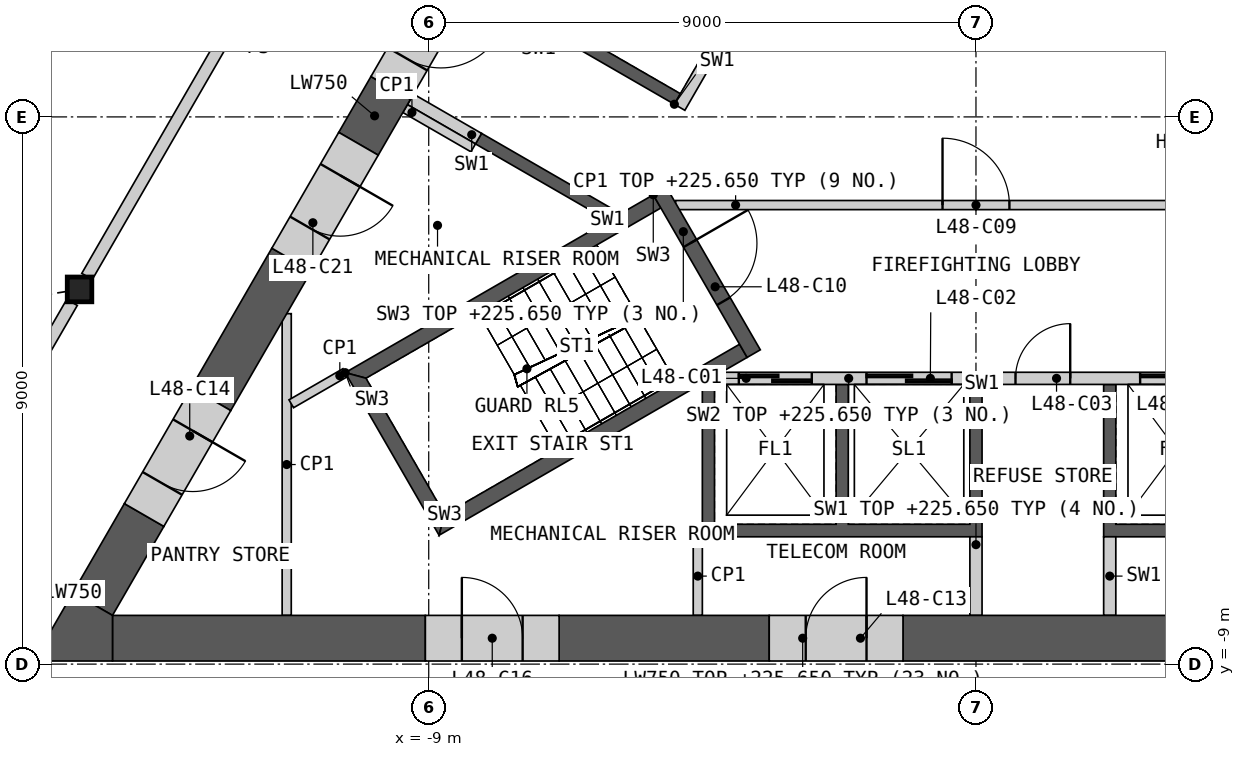
"""IFC4 building model, lengths in metres.
Left out: names, types, materials, properties, quantities, classifications, styles, units other than length and angle.
Written with IfcOpenShell. Run it as: python <this file> out.ifc"""

import sys

from ifc_helpers import new_model, si_unit, direction, frame, frame_2d, origin, origin_2d, place, context, subcontext, project, spatial, polyline, rectangle, i_section, outline, extrude, element, fill, save


model = new_model("IFC4")
c1 = context("Model", 3, precision=1e-05, world=origin(), true_north=direction((0.0, 1.0)))
c2 = subcontext(c1, "Body", "Model", "MODEL_VIEW")
j1 = project(units=[si_unit("LENGTHUNIT", "METRE"), si_unit("PLANEANGLEUNIT", "RADIAN")], contexts=[c1])
p1 = place(None, origin())
s1 = spatial("IfcSite", under=j1, at=p1, CompositionType="ELEMENT")
p2 = place(p1, origin())
s2 = spatial("IfcBuilding", under=s1, at=p2, CompositionType="ELEMENT")
p3 = place(p2, frame((0.0, 0.0, 216.0)))
s3 = spatial("IfcBuildingStorey", under=s2, at=p3, CompositionType="ELEMENT", Elevation=216.0)
p4 = place(p3, frame((-14.743, -2.837, 0.0), z_axis=(0.0, 0.0, 1.0), x_axis=(1.0, 0.0, 0.0)))
e1 = element("IfcColumn", 1, at=p4, inside=s3, PredefinedType="COLUMN", context=c2, shape_type="SweptSolid", body=[
    extrude(i_section(OverallWidth=0.404, OverallDepth=0.407, WebThickness=0.027, FlangeThickness=0.044, at=origin_2d()), origin(), (0.0, 0.0, 1.0), 10.0),
])
p5 = place(p3, origin())
e2 = element("IfcWall", 2, at=p5, inside=s3, PredefinedType="SHEAR", context=c2, shape_type="SweptSolid", body=[
    extrude(outline(polyline([(4.5, -4.4), (4.5, -6.906), (2.1, -6.906), (2.1, -4.4), (2.3, -4.4), (2.3, -6.7), (4.3, -6.7), (4.3, -4.4), (4.5, -4.4)])), origin(), (0.0, 0.0, 1.0), 9.65),
])
p6 = place(p3, origin())
e3 = element("IfcWall", 3, at=p6, inside=s3, PredefinedType="SHEAR", context=c2, shape_type="SweptSolid", body=[
    extrude(outline(polyline([(0.1, -4.4), (0.1, -6.906), (-4.5, -6.906), (-4.5, -4.4), (-4.3, -4.4), (-4.3, -6.7), (-2.3, -6.7), (-2.3, -4.4), (-2.1, -4.4), (-2.1, -6.7), (-0.1, -6.7), (-0.1, -4.4), (0.1, -4.4)])), origin(), (0.0, 0.0, 1.0), 9.65),
])
p7 = place(p3, frame((-4.187, -4.3, 0.0), z_axis=(0.0, 0.0, 1.0), x_axis=(1.0, 0.0, 0.0)))
e4 = element("IfcWall", 4, at=p7, inside=s3, PredefinedType="SOLIDWALL", context=c2, shape_type="SweptSolid", body=[
    extrude(rectangle(XDim=8.373, YDim=0.2, at=frame_2d((4.187, 0.0))), origin(), (0.0, 0.0, 1.0), 9.65),
])
p8 = place(p7, frame((0.287, 0.0, 0.0)))
e5 = element("IfcOpeningElement", 5, at=p8, cuts=e4, PredefinedType="OPENING", context=c2, shape_type="SweptSolid", body=[
    extrude(rectangle(XDim=1.2, YDim=2.1, at=frame_2d((0.6, 1.05))), frame((0.0, 0.11, 0.0), z_axis=(0.0, -1.0, 0.0), x_axis=(1.0, 0.0, 0.0)), (0.0, 0.0, 1.0), 0.22),
])
p9 = place(p7, frame((2.387, 0.0, 0.0)))
e6 = element("IfcOpeningElement", 6, at=p9, cuts=e4, PredefinedType="OPENING", context=c2, shape_type="SweptSolid", body=[
    extrude(rectangle(XDim=1.4, YDim=2.1, at=frame_2d((0.7, 1.05))), frame((0.0, 0.11, 0.0), z_axis=(0.0, -1.0, 0.0), x_axis=(1.0, 0.0, 0.0)), (0.0, 0.0, 1.0), 0.22),
])
p10 = place(p7, frame((4.837, 0.0, 0.0)))
e7 = element("IfcOpeningElement", 7, at=p10, cuts=e4, PredefinedType="OPENING", context=c2, shape_type="SweptSolid", body=[
    extrude(rectangle(XDim=0.9, YDim=2.1, at=frame_2d((0.45, 1.05))), frame((0.0, 0.11, 0.0), z_axis=(0.0, -1.0, 0.0), x_axis=(1.0, 0.0, 0.0)), (0.0, 0.0, 1.0), 0.22),
])
p11 = place(p7, frame((6.887, 0.0, 0.0)))
e8 = element("IfcOpeningElement", 8, at=p11, cuts=e4, PredefinedType="OPENING", context=c2, shape_type="SweptSolid", body=[
    extrude(rectangle(XDim=1.2, YDim=2.1, at=frame_2d((0.6, 1.05))), frame((0.0, 0.11, 0.0), z_axis=(0.0, -1.0, 0.0), x_axis=(1.0, 0.0, 0.0)), (0.0, 0.0, 1.0), 0.22),
])
for number, where, z_axis, x_axis in (
    (9, (0.0, -6.906, 0.0), (0.0, 0.0, 1.0), (0.0, -1.0, 0.0)),
    (10, (2.2, -6.906, 0.0), (0.0, 0.0, 1.0), (0.0, -1.0, 0.0)),
):
    element("IfcWall", number, at=place(p3, frame(where, z_axis=z_axis, x_axis=x_axis)), inside=s3, PredefinedType="SHEAR", context=c2, shape_type="SweptSolid", body=[
        extrude(rectangle(XDim=1.293, YDim=0.2, at=frame_2d((0.646, 0.0))), origin(), (0.0, 0.0, 1.0), 9.65),
    ])
p12 = place(p3, origin())
e11 = element("IfcWall", 11, at=p12, inside=s3, PredefinedType="SHEAR", context=c2, shape_type="SweptSolid", body=[
    extrude(outline(polyline([(1.561, 6.097), (3.731, 7.35), (8.231, -0.444), (6.061, -1.697), (5.96, -1.524), (7.952, -0.374), (4.752, 5.169), (2.76, 4.019), (2.66, 4.192), (4.652, 5.342), (3.652, 7.074), (1.66, 5.924), (1.561, 6.097)])), origin(), (0.0, 0.0, 1.0), 9.65),
])
p13 = place(p3, frame((5.817, -1.476, 0.0), z_axis=(0.0, 0.0, 1.0), x_axis=(-0.500002616675, 0.866023893041, 0.0)))
e12 = element("IfcWall", 12, at=p13, inside=s3, PredefinedType="SOLIDWALL", context=c2, shape_type="SweptSolid", body=[
    extrude(rectangle(XDim=8.373, YDim=0.2, at=frame_2d((4.187, 0.0))), origin(), (0.0, 0.0, 1.0), 9.65),
])
p14 = place(p13, frame((2.637, 0.0, 0.0)))
e13 = element("IfcOpeningElement", 13, at=p14, cuts=e12, PredefinedType="OPENING", context=c2, shape_type="SweptSolid", body=[
    extrude(rectangle(XDim=0.9, YDim=2.1, at=frame_2d((0.45, 1.05))), frame((0.0, 0.11, 0.0), z_axis=(0.0, -1.0, 0.0), x_axis=(1.0, 0.0, 0.0)), (0.0, 0.0, 1.0), 0.22),
])
p15 = place(p13, frame((6.937, 0.0, 0.0)))
e14 = element("IfcOpeningElement", 14, at=p15, cuts=e12, PredefinedType="OPENING", context=c2, shape_type="SweptSolid", body=[
    extrude(rectangle(XDim=1.1, YDim=2.1, at=frame_2d((0.55, 1.05))), frame((0.0, 0.11, 0.0), z_axis=(0.0, -1.0, 0.0), x_axis=(1.0, 0.0, 0.0)), (0.0, 0.0, 1.0), 0.22),
])
p16 = place(p3, origin())
e15 = element("IfcWall", 15, at=p16, inside=s3, PredefinedType="SHEAR", context=c2, shape_type="SweptSolid", body=[
    extrude(outline(polyline([(-6.061, -1.697), (-8.231, -0.444), (-8.131, -0.271), (-5.96, -1.524), (-6.061, -1.697)])), origin(), (0.0, 0.0, 1.0), 9.65),
])
p17 = place(p3, origin())
e16 = element("IfcWall", 16, at=p17, inside=s3, PredefinedType="SHEAR", context=c2, shape_type="SweptSolid", body=[
    extrude(outline(polyline([(-4.96, 0.208), (-7.131, 1.461), (-3.731, 7.35), (-1.561, 6.097), (-1.66, 5.924), (-3.652, 7.074), (-4.652, 5.342), (-2.66, 4.192), (-2.76, 4.019), (-4.752, 5.169), (-5.752, 3.437), (-3.76, 2.287), (-3.861, 2.113), (-5.852, 3.263), (-6.852, 1.531), (-4.861, 0.381), (-4.96, 0.208)])), origin(), (0.0, 0.0, 1.0), 9.65),
])
p18 = place(p3, frame((-1.631, 5.776, 0.0), z_axis=(0.0, 0.0, 1.0), x_axis=(-0.499992876559, -0.866029516466, 0.0)))
e17 = element("IfcWall", 17, at=p18, inside=s3, PredefinedType="SOLIDWALL", context=c2, shape_type="SweptSolid", body=[
    extrude(rectangle(XDim=6.486, YDim=0.2, at=frame_2d((3.243, 0.0))), origin(), (0.0, 0.0, 1.0), 9.65),
])
p19 = place(p18, frame((0.337, 0.0, 0.0)))
e18 = element("IfcOpeningElement", 18, at=p19, cuts=e17, PredefinedType="OPENING", context=c2, shape_type="SweptSolid", body=[
    extrude(rectangle(XDim=1.1, YDim=2.1, at=frame_2d((0.55, 1.05))), frame((0.0, 0.11, 0.0), z_axis=(0.0, -1.0, 0.0), x_axis=(1.0, 0.0, 0.0)), (0.0, 0.0, 1.0), 0.22),
])
p20 = place(p18, frame((2.537, 0.0, 0.0)))
e19 = element("IfcOpeningElement", 19, at=p20, cuts=e17, PredefinedType="OPENING", context=c2, shape_type="SweptSolid", body=[
    extrude(rectangle(XDim=1.1, YDim=2.1, at=frame_2d((0.55, 1.05))), frame((0.0, 0.11, 0.0), z_axis=(0.0, -1.0, 0.0), x_axis=(1.0, 0.0, 0.0)), (0.0, 0.0, 1.0), 0.22),
])
p21 = place(p3, frame((-8.181, -0.357, 0.0), z_axis=(0.0, 0.0, 1.0), x_axis=(-0.866003189247, 0.500038474733, 0.0)))
e20 = element("IfcWall", 20, at=p21, inside=s3, PredefinedType="SHEAR", context=c2, shape_type="SweptSolid", body=[
    extrude(rectangle(XDim=1.293, YDim=0.2, at=frame_2d((0.646, 0.0))), origin(), (0.0, 0.0, 1.0), 9.65),
])
p22 = place(p3, frame((-4.941, -1.45, 0.0), z_axis=(0.0, 0.0, 1.0), x_axis=(1.0, 0.0, 0.0)))
e21 = element("IfcWall", 21, at=p22, inside=s3, PredefinedType="PARTITIONING", context=c2, shape_type="SweptSolid", body=[
    extrude(rectangle(XDim=9.882, YDim=0.15, at=frame_2d((4.941, 0.0))), origin(), (0.0, 0.0, 1.0), 9.65),
])
p23 = place(p22, frame((4.391, 0.0, 0.0)))
e22 = element("IfcOpeningElement", 22, at=p23, cuts=e21, PredefinedType="OPENING", context=c2, shape_type="SweptSolid", body=[
    extrude(rectangle(XDim=1.1, YDim=2.1, at=frame_2d((0.55, 1.05))), frame((0.0, 0.085, 0.0), z_axis=(0.0, -1.0, 0.0), x_axis=(1.0, 0.0, 0.0)), (0.0, 0.0, 1.0), 0.17),
])
p24 = place(p3, origin())
e23 = element("IfcWall", 23, at=p24, inside=s3, PredefinedType="SHEAR", context=c2, shape_type="SweptSolid", body=[
    extrude(outline(polyline([(-5.307, -1.281), (-10.374, -4.206), (-10.032, -4.298), (-5.182, -1.498), (-5.307, -1.281)])), origin(), (0.0, 0.0, 1.0), 9.65),
])
p25 = place(p3, origin())
e24 = element("IfcWall", 24, at=p25, inside=s3, PredefinedType="SHEAR", context=c2, shape_type="SweptSolid", body=[
    extrude(outline(polyline([(-10.374, -4.206), (-8.83, -6.881), (-8.738, -6.539), (-10.032, -4.298), (-10.374, -4.206)])), origin(), (0.0, 0.0, 1.0), 9.65),
])
p26 = place(p3, origin())
e25 = element("IfcWall", 25, at=p26, inside=s3, PredefinedType="SHEAR", context=c2, shape_type="SweptSolid", body=[
    extrude(outline(polyline([(-8.738, -6.539), (-8.83, -6.881), (-3.763, -3.956), (-3.888, -3.739), (-8.738, -6.539)])), origin(), (0.0, 0.0, 1.0), 9.65),
])
p27 = place(p3, frame((-5.199, -1.219, 0.0), z_axis=(0.0, 0.0, 1.0), x_axis=(0.499982516597, -0.866035497597, 0.0)))
e26 = element("IfcWall", 26, at=p27, inside=s3, PredefinedType="SHEAR", context=c2, shape_type="SweptSolid", body=[
    extrude(rectangle(XDim=3.088, YDim=0.25, at=frame_2d((1.544, 0.0))), origin(), (0.0, 0.0, 1.0), 9.65),
])
p28 = place(p27, frame((0.994, 0.0, 0.0)))
e27 = element("IfcOpeningElement", 27, at=p28, cuts=e26, PredefinedType="OPENING", context=c2, shape_type="SweptSolid", body=[
    extrude(rectangle(XDim=1.1, YDim=2.1, at=frame_2d((0.55, 1.05))), frame((0.0, 0.135, 0.0), z_axis=(0.0, -1.0, 0.0), x_axis=(1.0, 0.0, 0.0)), (0.0, 0.0, 1.0), 0.27),
])
for number, where, z_axis, x_axis in (
    (28, (-8.268, -0.509, 0.0), (0.0, 0.0, 1.0), (-0.866, 0.5, 0.0)),
    (29, (-4.575, -6.906, 0.0), (0.0, 0.0, 1.0), (0.0, -1.0, 0.0)),
):
    element("IfcWall", number, at=place(p3, frame(where, z_axis=z_axis, x_axis=x_axis)), inside=s3, PredefinedType="PARTITIONING", context=c2, shape_type="SweptSolid", body=[
        extrude(rectangle(XDim=1.293, YDim=0.15, at=frame_2d((0.646, 0.0))), origin(), (0.0, 0.0, 1.0), 9.65),
    ])
p29 = place(p3, frame((-11.336, -8.199, 0.0), z_axis=(0.0, 0.0, 1.0), x_axis=(0.0, 1.0, 0.0)))
e30 = element("IfcWall", 30, at=p29, inside=s3, PredefinedType="PARTITIONING", context=c2, shape_type="SweptSolid", body=[
    extrude(rectangle(XDim=4.963, YDim=0.15, at=frame_2d((2.481, 0.0))), origin(), (0.0, 0.0, 1.0), 9.65),
])
p30 = place(p3, frame((-10.374, -4.206, 0.0), z_axis=(0.0, 0.0, 1.0), x_axis=(-0.866034781647, -0.499983756713, 0.0)))
e31 = element("IfcWall", 31, at=p30, inside=s3, PredefinedType="PARTITIONING", context=c2, shape_type="SweptSolid", body=[
    extrude(rectangle(XDim=1.024, YDim=0.15, at=frame_2d((0.512, 0.0))), origin(), (0.0, 0.0, 1.0), 9.65),
])
p31 = place(p3, frame((-1.2, -8.574, 0.0), z_axis=(0.0, 0.0, 1.0), x_axis=(1.0, 0.0, 0.0)))
e32 = element("IfcWall", 32, at=p31, inside=s3, PredefinedType="SHEAR", context=c2, shape_type="SweptSolid", body=[
    extrude(rectangle(XDim=8.35, YDim=0.75, at=frame_2d((4.175, 0.0))), origin(), (0.0, 0.0, 1.0), 9.65),
])
p32 = place(p3, frame((-14.201, -8.574, 0.0), z_axis=(0.0, 0.0, 1.0), x_axis=(1.0, 0.0, 0.0)))
e33 = element("IfcWall", 33, at=p32, inside=s3, PredefinedType="SHEAR", context=c2, shape_type="SweptSolid", body=[
    extrude(rectangle(XDim=5.146, YDim=0.75, at=frame_2d((2.573, 0.0))), origin(), (0.0, 0.0, 1.0), 9.65),
])
p33 = place(p3, frame((-6.855, -8.574, 0.0), z_axis=(0.0, 0.0, 1.0), x_axis=(1.0, 0.0, 0.0)))
e34 = element("IfcWall", 34, at=p33, inside=s3, PredefinedType="SHEAR", context=c2, shape_type="SweptSolid", body=[
    extrude(rectangle(XDim=3.455, YDim=0.75, at=frame_2d((1.728, 0.0))), origin(), (0.0, 0.0, 1.0), 9.65),
])
p34 = place(p3, frame((-11.255, -2.347, 0.0), z_axis=(0.0, 0.0, 1.0), x_axis=(-0.499982920237, -0.866035264566, 0.0)))
e35 = element("IfcWall", 35, at=p34, inside=s3, PredefinedType="SHEAR", context=c2, shape_type="SweptSolid", body=[
    extrude(rectangle(XDim=2.65, YDim=0.75, at=frame_2d((1.325, 0.0))), origin(), (0.0, 0.0, 1.0), 9.65),
])
p35 = place(p3, frame((-13.681, -6.548, 0.0), z_axis=(0.0, 0.0, 1.0), x_axis=(-0.499914175736, -0.866074948776, 0.0)))
e36 = element("IfcWall", 36, at=p35, inside=s3, PredefinedType="SHEAR", context=c2, shape_type="SweptSolid", body=[
    extrude(rectangle(XDim=1.69, YDim=0.75, at=frame_2d((0.845, 0.0))), origin(), (0.0, 0.0, 1.0), 9.65),
])
p36 = place(p3, frame((-9.625, 0.477, 0.0), z_axis=(0.0, 0.0, 1.0), x_axis=(-0.499928435111, -0.86606671785, 0.0)))
e37 = element("IfcWall", 37, at=p36, inside=s3, PredefinedType="SHEAR", context=c2, shape_type="SweptSolid", body=[
    extrude(rectangle(XDim=1.06, YDim=0.75, at=frame_2d((0.53, 0.0))), origin(), (0.0, 0.0, 1.0), 9.65),
])
p37 = place(p3, origin())
e38 = element("IfcWall", 38, at=p37, inside=s3, PredefinedType="SHEAR", context=c2, shape_type="SweptSolid", body=[
    extrude(outline(polyline([(-14.851, -7.824), (-14.201, -8.199), (-14.201, -8.949), (-15.5, -8.949), (-14.851, -7.824)])), origin(), (0.0, 0.0, 1.0), 9.65),
])
p38 = place(p3, frame((-3.4, -8.574, 0.0), z_axis=(0.0, 0.0, 1.0), x_axis=(1.0, 0.0, 0.0)))
e39 = element("IfcWall", 39, at=p38, inside=s3, PredefinedType="SHEAR", context=c2, shape_type="SweptSolid", body=[
    extrude(rectangle(XDim=2.2, YDim=0.75, at=frame_2d((1.1, 0.0))), origin(), (0.0, 0.0, 1.0), 9.65),
])
p39 = place(p38, frame((0.6, 0.0, 0.0)))
e40 = element("IfcOpeningElement", 40, at=p39, cuts=e39, PredefinedType="OPENING", context=c2, shape_type="SweptSolid", body=[
    extrude(rectangle(XDim=1.0, YDim=2.1, at=frame_2d((0.5, 1.05))), frame((0.0, 0.385, 0.0), z_axis=(0.0, -1.0, 0.0), x_axis=(1.0, 0.0, 0.0)), (0.0, 0.0, 1.0), 0.77),
])
p40 = place(p3, frame((-12.581, -4.642, 0.0), z_axis=(0.0, 0.0, 1.0), x_axis=(-0.50002983664, -0.866008176907, 0.0)))
e41 = element("IfcWall", 41, at=p40, inside=s3, PredefinedType="SHEAR", context=c2, shape_type="SweptSolid", body=[
    extrude(rectangle(XDim=2.2, YDim=0.75, at=frame_2d((1.1, 0.0))), origin(), (0.0, 0.0, 1.0), 9.65),
])
p41 = place(p40, frame((0.6, 0.0, 0.0)))
e42 = element("IfcOpeningElement", 42, at=p41, cuts=e41, PredefinedType="OPENING", context=c2, shape_type="SweptSolid", body=[
    extrude(rectangle(XDim=1.0, YDim=2.1, at=frame_2d((0.5, 1.05))), frame((0.0, 0.385, 0.0), z_axis=(0.0, -1.0, 0.0), x_axis=(1.0, 0.0, 0.0)), (0.0, 0.0, 1.0), 0.77),
])
p42 = place(p3, frame((-9.055, -8.574, 0.0), z_axis=(0.0, 0.0, 1.0), x_axis=(1.0, 0.0, 0.0)))
e43 = element("IfcWall", 43, at=p42, inside=s3, PredefinedType="SHEAR", context=c2, shape_type="SweptSolid", body=[
    extrude(rectangle(XDim=2.2, YDim=0.75, at=frame_2d((1.1, 0.0))), origin(), (0.0, 0.0, 1.0), 9.65),
])
p43 = place(p42, frame((0.6, 0.0, 0.0)))
e44 = element("IfcOpeningElement", 44, at=p43, cuts=e43, PredefinedType="OPENING", context=c2, shape_type="SweptSolid", body=[
    extrude(rectangle(XDim=1.0, YDim=2.1, at=frame_2d((0.5, 1.05))), frame((0.0, 0.385, 0.0), z_axis=(0.0, -1.0, 0.0), x_axis=(1.0, 0.0, 0.0)), (0.0, 0.0, 1.0), 0.77),
])
p44 = place(p3, frame((-10.156, -0.442, 0.0), z_axis=(0.0, 0.0, 1.0), x_axis=(-0.499946605688, -0.86605622881, 0.0)))
e45 = element("IfcWall", 45, at=p44, inside=s3, PredefinedType="SHEAR", context=c2, shape_type="SweptSolid", body=[
    extrude(rectangle(XDim=2.2, YDim=0.75, at=frame_2d((1.1, 0.0))), origin(), (0.0, 0.0, 1.0), 9.65),
])
p45 = place(p44, frame((0.6, 0.0, 0.0)))
e46 = element("IfcOpeningElement", 46, at=p45, cuts=e45, PredefinedType="OPENING", context=c2, shape_type="SweptSolid", body=[
    extrude(rectangle(XDim=1.0, YDim=2.1, at=frame_2d((0.5, 1.05))), frame((0.0, 0.385, 0.0), z_axis=(0.0, -1.0, 0.0), x_axis=(1.0, 0.0, 0.0)), (0.0, 0.0, 1.0), 0.77),
])
p46 = place(p3, frame((-8.525, 2.382, 0.0), z_axis=(0.0, 0.0, 1.0), x_axis=(-0.500077893725, -0.86598042715, 0.0)))
e47 = element("IfcWall", 47, at=p46, inside=s3, PredefinedType="SHEAR", context=c2, shape_type="SweptSolid", body=[
    extrude(rectangle(XDim=2.2, YDim=0.75, at=frame_2d((1.1, 0.0))), origin(), (0.0, 0.0, 1.0), 9.65),
])
p47 = place(p46, frame((0.55, 0.0, 0.0)))
e48 = element("IfcOpeningElement", 48, at=p47, cuts=e47, PredefinedType="OPENING", context=c2, shape_type="SweptSolid", body=[
    extrude(rectangle(XDim=1.1, YDim=2.1, at=frame_2d((0.55, 1.05))), frame((0.0, 0.385, 0.0), z_axis=(0.0, -1.0, 0.0), x_axis=(1.0, 0.0, 0.0)), (0.0, 0.0, 1.0), 0.77),
])
p48 = place(p3, frame((-14.619, -2.624, 0.0), z_axis=(0.0, 0.0, 1.0), x_axis=(0.50000393355, 0.866023132736, 0.0)))
e49 = element("IfcWall", 49, at=p48, inside=s3, PredefinedType="PARTITIONING", context=c2, shape_type="SweptSolid", body=[
    extrude(rectangle(XDim=9.335, YDim=0.2, at=frame_2d((4.667, 0.0))), origin(), (0.0, 0.0, 1.0), 9.65),
])
p49 = place(p3, frame((-17.744, -8.035, 0.0), z_axis=(0.0, 0.0, 1.0), x_axis=(0.499975807604, 0.86603937082, 0.0)))
e50 = element("IfcWall", 50, at=p49, inside=s3, PredefinedType="PARTITIONING", context=c2, shape_type="SweptSolid", body=[
    extrude(rectangle(XDim=5.756, YDim=0.2, at=frame_2d((2.878, 0.0))), origin(), (0.0, 0.0, 1.0), 9.65),
])
p50 = place(p8, origin())
e51 = element("IfcDoor", 51, at=p50, inside=s3, OperationType="SLIDING_TO_LEFT", PredefinedType="DOOR", context=c2, shape_type="SweptSolid", body=[
    extrude(rectangle(XDim=1.2, YDim=2.1, at=frame_2d((0.6, 1.05))), frame((0.0, 0.025, 0.0), z_axis=(0.0, -1.0, 0.0), x_axis=(1.0, 0.0, 0.0)), (0.0, 0.0, 1.0), 0.05),
])
fill(e5, e51)
p51 = place(p9, origin())
e52 = element("IfcDoor", 52, at=p51, inside=s3, OperationType="SLIDING_TO_LEFT", PredefinedType="DOOR", context=c2, shape_type="SweptSolid", body=[
    extrude(rectangle(XDim=1.4, YDim=2.1, at=frame_2d((0.7, 1.05))), frame((0.0, 0.025, 0.0), z_axis=(0.0, -1.0, 0.0), x_axis=(1.0, 0.0, 0.0)), (0.0, 0.0, 1.0), 0.05),
])
fill(e6, e52)
p52 = place(p10, origin())
e53 = element("IfcDoor", 53, at=p52, inside=s3, OperationType="SINGLE_SWING_RIGHT", PredefinedType="DOOR", context=c2, shape_type="SweptSolid", body=[
    extrude(rectangle(XDim=0.9, YDim=2.1, at=frame_2d((0.45, 1.05))), frame((0.0, 0.025, 0.0), z_axis=(0.0, -1.0, 0.0), x_axis=(1.0, 0.0, 0.0)), (0.0, 0.0, 1.0), 0.05),
])
fill(e7, e53)
p53 = place(p11, origin())
e54 = element("IfcDoor", 54, at=p53, inside=s3, OperationType="SLIDING_TO_LEFT", PredefinedType="DOOR", context=c2, shape_type="SweptSolid", body=[
    extrude(rectangle(XDim=1.2, YDim=2.1, at=frame_2d((0.6, 1.05))), frame((0.0, 0.025, 0.0), z_axis=(0.0, -1.0, 0.0), x_axis=(1.0, 0.0, 0.0)), (0.0, 0.0, 1.0), 0.05),
])
fill(e8, e54)
p54 = place(p23, origin())
e55 = element("IfcDoor", 55, at=p54, inside=s3, OperationType="SINGLE_SWING_LEFT", PredefinedType="DOOR", context=c2, shape_type="SweptSolid", body=[
    extrude(rectangle(XDim=1.1, YDim=2.1, at=frame_2d((0.55, 1.05))), frame((0.0, 0.025, 0.0), z_axis=(0.0, -1.0, 0.0), x_axis=(1.0, 0.0, 0.0)), (0.0, 0.0, 1.0), 0.05),
])
fill(e22, e55)
p55 = place(p28, origin())
e56 = element("IfcDoor", 56, at=p55, inside=s3, OperationType="SINGLE_SWING_LEFT", PredefinedType="DOOR", context=c2, shape_type="SweptSolid", body=[
    extrude(rectangle(XDim=1.1, YDim=2.1, at=frame_2d((0.55, 1.05))), frame((0.0, 0.025, 0.0), z_axis=(0.0, -1.0, 0.0), x_axis=(1.0, 0.0, 0.0)), (0.0, 0.0, 1.0), 0.05),
])
fill(e27, e56)
p56 = place(p39, origin())
e57 = element("IfcDoor", 57, at=p56, inside=s3, OperationType="SINGLE_SWING_RIGHT", PredefinedType="DOOR", context=c2, shape_type="SweptSolid", body=[
    extrude(rectangle(XDim=1.0, YDim=2.1, at=frame_2d((0.5, 1.05))), frame((0.0, 0.13, 0.0), z_axis=(0.0, -1.0, 0.0), x_axis=(1.0, 0.0, 0.0)), (0.0, 0.0, 1.0), 0.05),
])
fill(e40, e57)
p57 = place(p41, origin())
e58 = element("IfcDoor", 58, at=p57, inside=s3, OperationType="SINGLE_SWING_LEFT", PredefinedType="DOOR", context=c2, shape_type="SweptSolid", body=[
    extrude(rectangle(XDim=1.0, YDim=2.1, at=frame_2d((0.5, 1.05))), frame((0.0, 0.13, 0.0), z_axis=(0.0, -1.0, 0.0), x_axis=(1.0, 0.0, 0.0)), (0.0, 0.0, 1.0), 0.05),
])
fill(e42, e58)
p58 = place(p43, origin())
e59 = element("IfcDoor", 59, at=p58, inside=s3, OperationType="SINGLE_SWING_LEFT", PredefinedType="DOOR", context=c2, shape_type="SweptSolid", body=[
    extrude(rectangle(XDim=1.0, YDim=2.1, at=frame_2d((0.5, 1.05))), frame((0.0, 0.13, 0.0), z_axis=(0.0, -1.0, 0.0), x_axis=(1.0, 0.0, 0.0)), (0.0, 0.0, 1.0), 0.05),
])
fill(e44, e59)
p59 = place(p45, origin())
e60 = element("IfcDoor", 60, at=p59, inside=s3, OperationType="SINGLE_SWING_LEFT", PredefinedType="DOOR", context=c2, shape_type="SweptSolid", body=[
    extrude(rectangle(XDim=1.0, YDim=2.1, at=frame_2d((0.5, 1.05))), frame((0.0, 0.13, 0.0), z_axis=(0.0, -1.0, 0.0), x_axis=(1.0, 0.0, 0.0)), (0.0, 0.0, 1.0), 0.05),
])
fill(e46, e60)
p60 = place(p47, origin())
e61 = element("IfcDoor", 61, at=p60, inside=s3, OperationType="SINGLE_SWING_LEFT", PredefinedType="DOOR", context=c2, shape_type="SweptSolid", body=[
    extrude(rectangle(XDim=1.1, YDim=2.1, at=frame_2d((0.55, 1.05))), frame((0.0, 0.13, 0.0), z_axis=(0.0, -1.0, 0.0), x_axis=(1.0, 0.0, 0.0)), (0.0, 0.0, 1.0), 0.05),
])
fill(e48, e61)
save(model, sys.argv[1])
